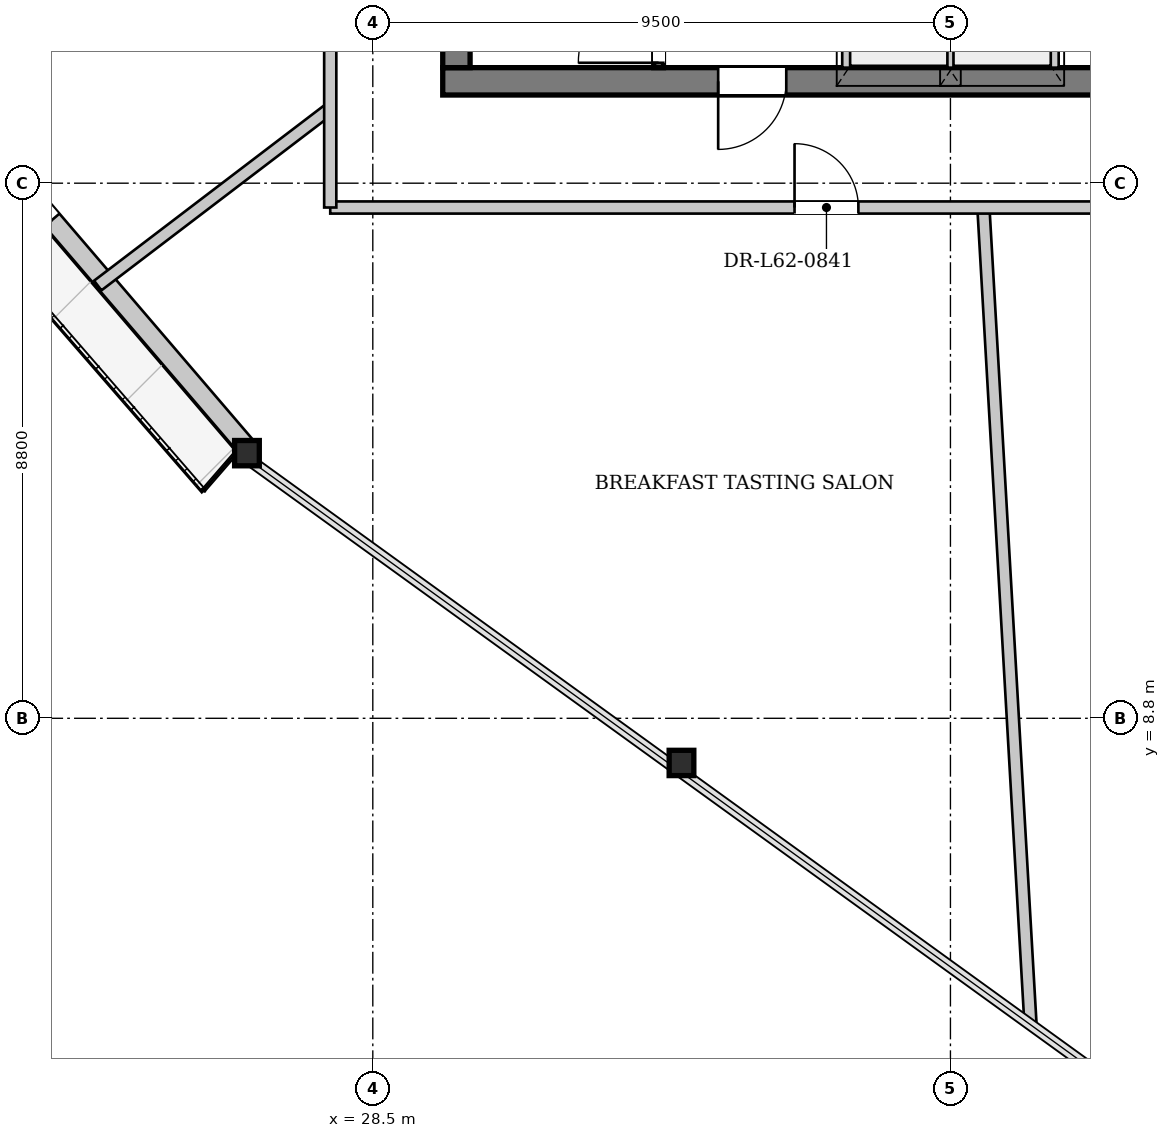
"""IFC4 building model, lengths in metres.
Left out: names, types, materials, properties, quantities, classifications, styles, units other than length and angle.
Written with IfcOpenShell. Run it as: python <this file> out.ifc"""

import sys

from ifc_helpers import new_model, si_unit, direction, frame, frame_2d, origin, origin_2d, place, context, subcontext, project, spatial, rectangle, i_section, extrude, source, transform, mapped, element, fill, save


model = new_model("IFC4")
c1 = context("Model", 3, precision=1e-05, world=origin(), true_north=direction((0.0, 1.0)))
c2 = subcontext(c1, "Body", "Model", "MODEL_VIEW")
j1 = project(units=[si_unit("LENGTHUNIT", "METRE"), si_unit("PLANEANGLEUNIT", "RADIAN")], contexts=[c1])
p1 = place(None, origin())
s1 = spatial("IfcSite", under=j1, at=p1, CompositionType="ELEMENT")
p2 = place(p1, origin())
s2 = spatial("IfcBuilding", under=s1, at=p2, CompositionType="ELEMENT")
p3 = place(p2, frame((0.0, 0.0, 234.5)))
s3 = spatial("IfcBuildingStorey", under=s2, at=p3, CompositionType="ELEMENT", Elevation=234.5)
m1 = source(origin(), c2, "Body", "SweptSolid", [
    extrude(i_section(OverallWidth=0.406, OverallDepth=0.416, WebThickness=0.027, FlangeThickness=0.042, at=origin_2d()), origin(), (0.0, 0.0, 1.0), 3.45),
])
p4 = place(p3, frame((26.271, 13.19, 0.0), z_axis=(0.092200505272, -0.016982441493, 0.995595632528), x_axis=(0.181143219121, 0.983456727145, 0.0)))
e1 = element("IfcColumn", 1, at=p4, inside=s3, PredefinedType="COLUMN", context=c2, shape_type="MappedRepresentation", body=[
    mapped(m1, transform((0.0, 0.0, 0.0), x_axis=(1.0, 0.0, 0.0), y_axis=(0.0, 1.0, 0.0), z_axis=(0.0, 0.0, 1.0), scale=1.0)),
])
m2 = source(origin(), c2, "Body", "SweptSolid", [
    extrude(i_section(OverallWidth=0.406, OverallDepth=0.416, WebThickness=0.027, FlangeThickness=0.042, at=origin_2d()), origin(), (0.0, 0.0, 1.0), 3.455),
])
p5 = place(p3, frame((33.391, 8.044, 0.0), z_axis=(0.107537422791, 0.012647305309, 0.994120590456), x_axis=(-0.116803387212, 0.993155057751, 0.0)))
e2 = element("IfcColumn", 2, at=p5, inside=s3, PredefinedType="COLUMN", context=c2, shape_type="MappedRepresentation", body=[
    mapped(m2, transform((0.0, 0.0, 0.0), x_axis=(1.0, 0.0, 0.0), y_axis=(0.0, 1.0, 0.0), z_axis=(0.0, 0.0, 1.0), scale=1.0)),
])
m3 = source(origin(), c2, "Body", "SweptSolid", [
    extrude(i_section(OverallWidth=0.305, OverallDepth=0.62, WebThickness=0.021, FlangeThickness=0.04, at=origin_2d()), origin(), (0.0, 0.0, 1.0), 3.464),
])
p6 = place(p3, frame((40.51, 2.898, 0.0), z_axis=(0.122692438195, 0.042212964089, 0.991546585528), x_axis=(-0.32533780478, 0.945597859971, 0.0)))
e3 = element("IfcColumn", 3, at=p6, inside=s3, PredefinedType="COLUMN", context=c2, shape_type="MappedRepresentation", body=[
    mapped(m3, transform((0.0, 0.0, 0.0), x_axis=(1.0, 0.0, 0.0), y_axis=(0.0, 1.0, 0.0), z_axis=(0.0, 0.0, 1.0), scale=1.0)),
])
p7 = place(p3, frame((26.393, 13.294, 0.0), z_axis=(0.0, 0.0, 1.0), x_axis=(-0.650264813907, 0.759707622573, 0.0)))
e4 = element("IfcWall", 4, at=p7, inside=s3, PredefinedType="SOLIDWALL", context=c2, shape_type="SweptSolid", body=[
    extrude(rectangle(XDim=17.57, YDim=0.32, at=frame_2d((8.785, 0.0))), origin(), (0.0, 0.0, 1.0), 2.872),
])
p8 = place(p7, frame((4.872, 0.0, 0.0)))
e5 = element("IfcOpeningElement", 5, at=p8, cuts=e4, PredefinedType="OPENING", context=c2, shape_type="SweptSolid", body=[
    extrude(rectangle(XDim=1.5, YDim=2.3, at=frame_2d((0.75, 1.15))), frame((0.0, 0.17, 0.0), z_axis=(0.0, -1.0, 0.0), x_axis=(1.0, 0.0, 0.0)), (0.0, 0.0, 1.0), 0.34),
])
p9 = place(p7, frame((11.701, 0.0, 0.402)))
e6 = element("IfcOpeningElement", 6, at=p9, cuts=e4, PredefinedType="OPENING", context=c2, shape_type="SweptSolid", body=[
    extrude(rectangle(XDim=2.6, YDim=2.35, at=frame_2d((1.3, 1.175))), frame((0.0, 0.17, 0.0), z_axis=(0.0, -1.0, 0.0), x_axis=(1.0, 0.0, 0.0)), (0.0, 0.0, 1.0), 0.34),
])
p10 = place(p3, frame((46.35, 19.275, 0.0), z_axis=(0.0, 0.0, 1.0), x_axis=(-1.0, 0.0, 0.0)))
e7 = element("IfcWall", 7, at=p10, inside=s3, PredefinedType="SHEAR", context=c2, shape_type="SweptSolid", body=[
    extrude(rectangle(XDim=16.7, YDim=0.45, at=frame_2d((8.35, 0.0))), origin(), (0.0, 0.0, 1.0), 3.38),
])
p11 = place(p10, frame((4.55, 0.0, 0.0)))
e8 = element("IfcOpeningElement", 8, at=p11, cuts=e7, PredefinedType="OPENING", context=c2, shape_type="SweptSolid", body=[
    extrude(rectangle(XDim=1.12, YDim=2.25, at=frame_2d((0.56, 1.125))), frame((0.0, 0.235, 0.0), z_axis=(0.0, -1.0, 0.0), x_axis=(1.0, 0.0, 0.0)), (0.0, 0.0, 1.0), 0.47),
])
p12 = place(p10, frame((11.05, 0.0, 0.0)))
e9 = element("IfcOpeningElement", 9, at=p12, cuts=e7, PredefinedType="OPENING", context=c2, shape_type="SweptSolid", body=[
    extrude(rectangle(XDim=1.12, YDim=2.25, at=frame_2d((0.56, 1.125))), frame((0.0, 0.235, 0.0), z_axis=(0.0, -1.0, 0.0), x_axis=(1.0, 0.0, 0.0)), (0.0, 0.0, 1.0), 0.47),
])
p13 = place(p3, frame((29.875, 19.5, 0.0), z_axis=(0.0, 0.0, 1.0), x_axis=(0.0, 1.0, 0.0)))
e10 = element("IfcWall", 10, at=p13, inside=s3, PredefinedType="SHEAR", context=c2, shape_type="SweptSolid", body=[
    extrude(rectangle(XDim=14.2, YDim=0.45, at=frame_2d((7.1, 0.0))), origin(), (0.0, 0.0, 1.0), 3.38),
])
p14 = place(p13, frame((7.42, 0.0, 0.0)))
e11 = element("IfcOpeningElement", 11, at=p14, cuts=e10, PredefinedType="OPENING", context=c2, shape_type="SweptSolid", body=[
    extrude(rectangle(XDim=1.6, YDim=2.2, at=frame_2d((0.8, 1.1))), frame((0.0, 0.235, 0.0), z_axis=(0.0, -1.0, 0.0), x_axis=(1.0, 0.0, 0.0)), (0.0, 0.0, 1.0), 0.47),
])
p15 = place(p3, frame((33.2, 19.5, 0.0), z_axis=(0.0, 0.0, 1.0), x_axis=(0.0, 1.0, 0.0)))
e12 = element("IfcWall", 12, at=p15, inside=s3, PredefinedType="PARTITIONING", context=c2, shape_type="SweptSolid", body=[
    extrude(rectangle(XDim=7.46, YDim=0.16, at=frame_2d((3.73, 0.0))), origin(), (0.0, 0.0, 1.0), 3.38),
])
p16 = place(p15, frame((0.08, 0.0, 0.0)))
e13 = element("IfcOpeningElement", 13, at=p16, cuts=e12, PredefinedType="OPENING", context=c2, shape_type="SweptSolid", body=[
    extrude(rectangle(XDim=1.32, YDim=2.2, at=frame_2d((0.66, 1.1))), frame((0.0, 0.09, 0.0), z_axis=(0.0, -1.0, 0.0), x_axis=(1.0, 0.0, 0.0)), (0.0, 0.0, 1.0), 0.18),
])
p17 = place(p3, frame((36.3, 19.5, 0.0), z_axis=(0.0, 0.0, 1.0), x_axis=(0.0, 1.0, 0.0)))
e14 = element("IfcWall", 14, at=p17, inside=s3, PredefinedType="PARTITIONING", context=c2, shape_type="SweptSolid", body=[
    extrude(rectangle(XDim=4.78, YDim=0.16, at=frame_2d((2.39, 0.0))), origin(), (0.0, 0.0, 1.0), 3.38),
])
p18 = place(p17, frame((0.6, 0.0, 0.0)))
e15 = element("IfcOpeningElement", 15, at=p18, cuts=e14, PredefinedType="OPENING", context=c2, shape_type="SweptSolid", body=[
    extrude(rectangle(XDim=1.2, YDim=2.2, at=frame_2d((0.6, 1.1))), frame((0.0, 0.09, 0.0), z_axis=(0.0, -1.0, 0.0), x_axis=(1.0, 0.0, 0.0)), (0.0, 0.0, 1.0), 0.18),
])
p19 = place(p17, frame((2.65, 0.0, 0.0)))
e16 = element("IfcOpeningElement", 16, at=p19, cuts=e14, PredefinedType="OPENING", context=c2, shape_type="SweptSolid", body=[
    extrude(rectangle(XDim=0.95, YDim=2.1, at=frame_2d((0.475, 1.05))), frame((0.0, 0.09, 0.0), z_axis=(0.0, -1.0, 0.0), x_axis=(1.0, 0.0, 0.0)), (0.0, 0.0, 1.0), 0.18),
])
p20 = place(p3, frame((39.7, 24.28, 0.0), z_axis=(0.0, 0.0, 1.0), x_axis=(0.0, -1.0, 0.0)))
e17 = element("IfcWall", 17, at=p20, inside=s3, PredefinedType="PARTITIONING", context=c2, shape_type="SweptSolid", body=[
    extrude(rectangle(XDim=4.78, YDim=0.16, at=frame_2d((2.39, 0.0))), origin(), (0.0, 0.0, 1.0), 3.38),
])
p21 = place(p20, frame((3.12, 0.0, 0.0)))
e18 = element("IfcOpeningElement", 18, at=p21, cuts=e17, PredefinedType="OPENING", context=c2, shape_type="SweptSolid", body=[
    extrude(rectangle(XDim=1.2, YDim=2.2, at=frame_2d((0.6, 1.1))), frame((0.0, 0.09, 0.0), z_axis=(0.0, -1.0, 0.0), x_axis=(1.0, 0.0, 0.0)), (0.0, 0.0, 1.0), 0.18),
])
p22 = place(p3, frame((38.0, 19.5, 0.0), z_axis=(0.0, 0.0, 1.0), x_axis=(0.0, 1.0, 0.0)))
e19 = element("IfcWall", 19, at=p22, inside=s3, PredefinedType="PARTITIONING", context=c2, shape_type="SweptSolid", body=[
    extrude(rectangle(XDim=2.46, YDim=0.125, at=frame_2d((1.23, 0.0))), origin(), (0.0, 0.0, 1.0), 3.38),
])
p23 = place(p3, frame((27.8, 18.83, 0.0), z_axis=(0.0, 0.0, 1.0), x_axis=(-0.795504003678, -0.60594833124, 0.0)))
e20 = element("IfcWall", 20, at=p23, inside=s3, PredefinedType="PARTITIONING", context=c2, shape_type="SweptSolid", body=[
    extrude(rectangle(XDim=4.807, YDim=0.2, at=frame_2d((2.403, 0.0))), origin(), (0.0, 0.0, 1.0), 3.38),
])
p24 = place(p3, frame((38.542, 17.2, 0.0), z_axis=(0.0, 0.0, 1.0), x_axis=(0.057565160189, -0.998341751272, 0.0)))
e21 = element("IfcWall", 21, at=p24, inside=s3, PredefinedType="PARTITIONING", context=c2, shape_type="SweptSolid", body=[
    extrude(rectangle(XDim=13.423, YDim=0.2, at=frame_2d((6.711, 0.0))), origin(), (0.0, 0.0, 1.0), 3.38),
])
p25 = place(p3, frame((27.8, 17.2, 0.0), z_axis=(0.0, 0.0, 1.0), x_axis=(1.0, 0.0, 0.0)))
e22 = element("IfcWall", 22, at=p25, inside=s3, PredefinedType="PARTITIONING", context=c2, shape_type="SweptSolid", body=[
    extrude(rectangle(XDim=20.4, YDim=0.2, at=frame_2d((10.2, 0.0))), origin(), (0.0, 0.0, 1.0), 3.38),
])
p26 = place(p25, frame((7.636, 0.0, 0.0)))
e23 = element("IfcOpeningElement", 23, at=p26, cuts=e22, PredefinedType="OPENING", context=c2, shape_type="SweptSolid", body=[
    extrude(rectangle(XDim=1.05, YDim=2.2, at=frame_2d((0.525, 1.1))), frame((0.0, 0.11, 0.0), z_axis=(0.0, -1.0, 0.0), x_axis=(1.0, 0.0, 0.0)), (0.0, 0.0, 1.0), 0.22),
])
p27 = place(p25, frame((14.345, 0.0, 0.0)))
e24 = element("IfcOpeningElement", 24, at=p27, cuts=e22, PredefinedType="OPENING", context=c2, shape_type="SweptSolid", body=[
    extrude(rectangle(XDim=1.05, YDim=2.2, at=frame_2d((0.525, 1.1))), frame((0.0, 0.11, 0.0), z_axis=(0.0, -1.0, 0.0), x_axis=(1.0, 0.0, 0.0)), (0.0, 0.0, 1.0), 0.22),
])
p28 = place(p3, frame((27.8, 17.2, 0.0), z_axis=(0.0, 0.0, 1.0), x_axis=(0.0, 1.0, 0.0)))
e25 = element("IfcWall", 25, at=p28, inside=s3, PredefinedType="PARTITIONING", context=c2, shape_type="SweptSolid", body=[
    extrude(rectangle(XDim=18.8, YDim=0.2, at=frame_2d((9.4, 0.0))), origin(), (0.0, 0.0, 1.0), 3.38),
])
p29 = place(p28, frame((15.77, 0.0, 0.0)))
e26 = element("IfcOpeningElement", 26, at=p29, cuts=e25, PredefinedType="OPENING", context=c2, shape_type="SweptSolid", body=[
    extrude(rectangle(XDim=1.05, YDim=2.2, at=frame_2d((0.525, 1.1))), frame((0.0, 0.11, 0.0), z_axis=(0.0, -1.0, 0.0), x_axis=(1.0, 0.0, 0.0)), (0.0, 0.0, 1.0), 0.22),
])
p30 = place(p28, frame((4.148, 0.0, 0.0)))
e27 = element("IfcOpeningElement", 27, at=p30, cuts=e25, PredefinedType="OPENING", context=c2, shape_type="SweptSolid", body=[
    extrude(rectangle(XDim=1.05, YDim=2.2, at=frame_2d((0.525, 1.1))), frame((0.0, 0.11, 0.0), z_axis=(0.0, -1.0, 0.0), x_axis=(1.0, 0.0, 0.0)), (0.0, 0.0, 1.0), 0.22),
])
m4 = source(origin(), c2, "Body", "SweptSolid", [
    extrude(rectangle(XDim=1.5, YDim=2.3, at=frame_2d((0.75, 1.15))), frame((0.0, 0.025, 0.0), z_axis=(0.0, -1.0, 0.0), x_axis=(1.0, 0.0, 0.0)), (0.0, 0.0, 1.0), 0.05),
])
p31 = place(p8, origin())
e28 = element("IfcDoor", 28, at=p31, inside=s3, OperationType="DOUBLE_DOOR_SINGLE_SWING", PredefinedType="DOOR", context=c2, shape_type="MappedRepresentation", body=[
    mapped(m4, transform((0.0, 0.0, 0.0), x_axis=(1.0, 0.0, 0.0), y_axis=(0.0, 1.0, 0.0), z_axis=(0.0, 0.0, 1.0), scale=1.0)),
])
fill(e5, e28)
m5 = source(origin(), c2, "Body", "SweptSolid", [
    extrude(rectangle(XDim=1.12, YDim=2.25, at=frame_2d((0.56, 1.125))), frame((0.0, 0.025, 0.0), z_axis=(0.0, -1.0, 0.0), x_axis=(1.0, 0.0, 0.0)), (0.0, 0.0, 1.0), 0.05),
])
p32 = place(p12, origin())
e29 = element("IfcDoor", 29, at=p32, inside=s3, OperationType="SINGLE_SWING_RIGHT", PredefinedType="DOOR", context=c2, shape_type="MappedRepresentation", body=[
    mapped(m5, transform((0.0, 0.0, 0.0), x_axis=(1.0, 0.0, 0.0), y_axis=(0.0, 1.0, 0.0), z_axis=(0.0, 0.0, 1.0), scale=1.0)),
])
fill(e9, e29)
m6 = source(origin(), c2, "Body", "SweptSolid", [
    extrude(rectangle(XDim=1.32, YDim=2.2, at=frame_2d((0.66, 1.1))), frame((0.0, 0.025, 0.0), z_axis=(0.0, -1.0, 0.0), x_axis=(1.0, 0.0, 0.0)), (0.0, 0.0, 1.0), 0.05),
])
p33 = place(p16, origin())
e30 = element("IfcDoor", 30, at=p33, inside=s3, OperationType="SINGLE_SWING_LEFT", PredefinedType="DOOR", context=c2, shape_type="MappedRepresentation", body=[
    mapped(m6, transform((0.0, 0.0, 0.0), x_axis=(1.0, 0.0, 0.0), y_axis=(0.0, 1.0, 0.0), z_axis=(0.0, 0.0, 1.0), scale=1.0)),
])
fill(e13, e30)
m7 = source(origin(), c2, "Body", "SweptSolid", [
    extrude(rectangle(XDim=1.05, YDim=2.2, at=frame_2d((0.525, 1.1))), frame((0.0, 0.025, 0.0), z_axis=(0.0, -1.0, 0.0), x_axis=(1.0, 0.0, 0.0)), (0.0, 0.0, 1.0), 0.05),
])
p34 = place(p26, origin())
e31 = element("IfcDoor", 31, at=p34, inside=s3, OperationType="SINGLE_SWING_LEFT", PredefinedType="DOOR", context=c2, shape_type="MappedRepresentation", body=[
    mapped(m7, transform((0.0, 0.0, 0.0), x_axis=(1.0, 0.0, 0.0), y_axis=(0.0, 1.0, 0.0), z_axis=(0.0, 0.0, 1.0), scale=1.0)),
])
fill(e23, e31)
save(model, sys.argv[1])
